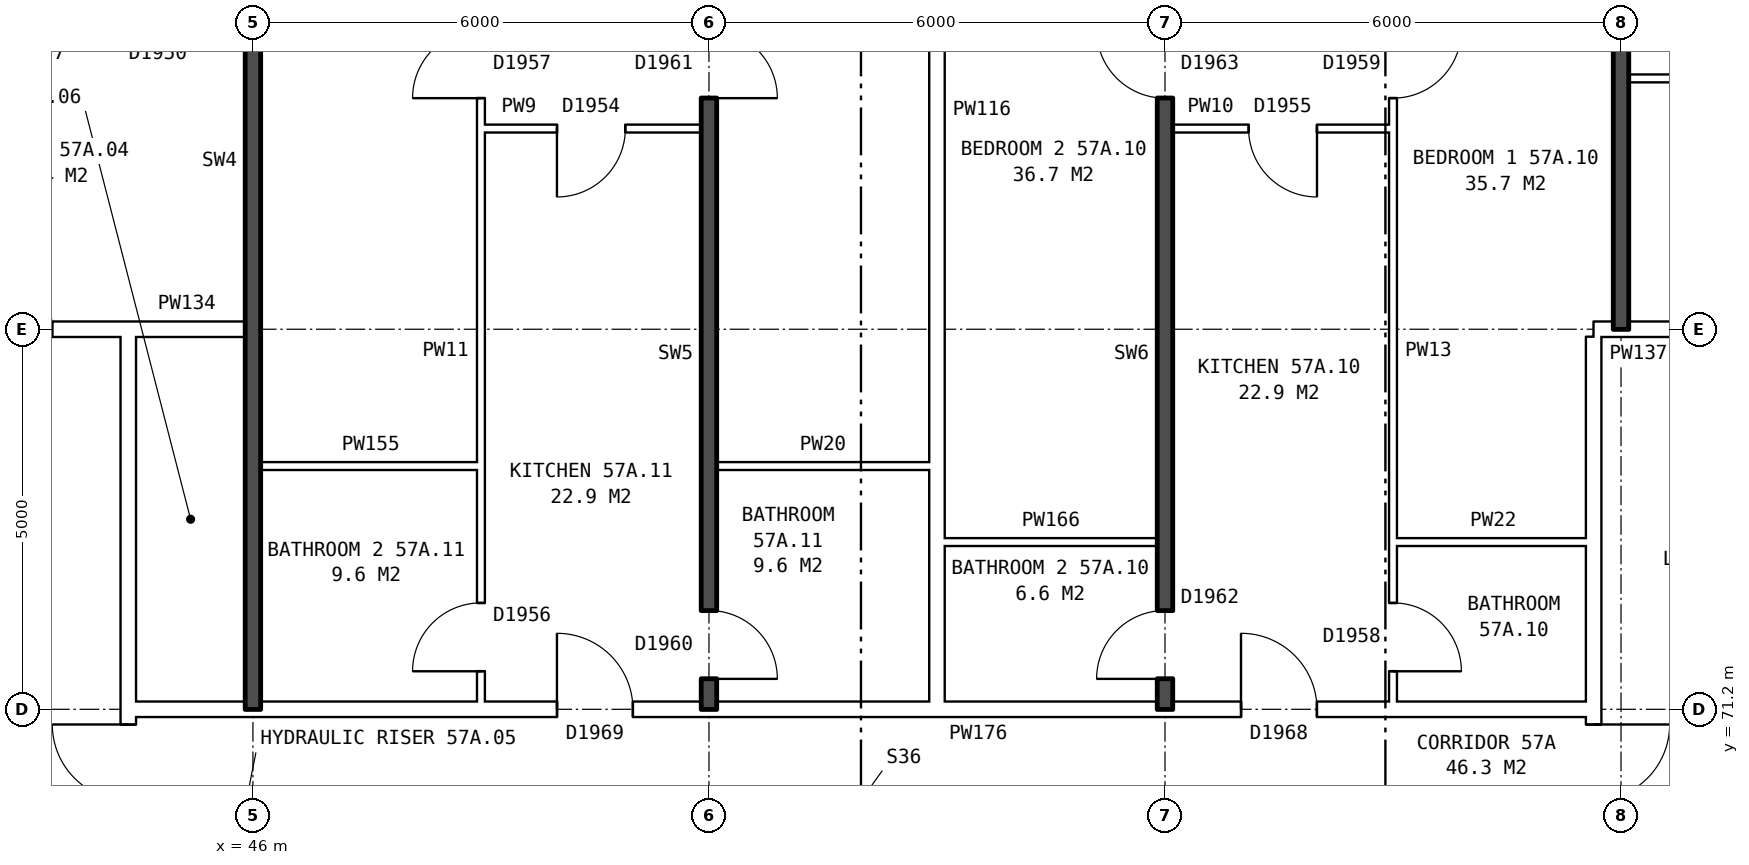
"""IFC4 building model, lengths in metres.
Left out: names, types, materials, properties, quantities, classifications, styles, units other than length and angle.
Written with IfcOpenShell. Run it as: python <this file> out.ifc"""

import sys

from ifc_helpers import new_model, si_unit, direction, frame, frame_2d, origin, place, context, subcontext, project, spatial, rectangle, extrude, element, fill, save


model = new_model("IFC4")
c1 = context("Model", 3, precision=1e-05, world=origin(), true_north=direction((0.0, 1.0)))
c2 = subcontext(c1, "Body", "Model", "MODEL_VIEW")
j1 = project(units=[si_unit("LENGTHUNIT", "METRE"), si_unit("PLANEANGLEUNIT", "RADIAN")], contexts=[c1])
p1 = place(None, origin())
s1 = spatial("IfcSite", under=j1, at=p1, CompositionType="ELEMENT")
p2 = place(p1, origin())
s2 = spatial("IfcBuilding", under=s1, at=p2, CompositionType="ELEMENT")
p3 = place(p2, frame((0.0, 0.0, 202.8)))
s3 = spatial("IfcBuildingStorey", under=s2, at=p3, CompositionType="ELEMENT", Elevation=202.8)
p4 = place(p3, frame((63.64, 63.9, 0.0), z_axis=(0.0, 0.0, 1.0), x_axis=(0.0, 1.0, 0.0)))
e1 = element("IfcWall", 1, at=p4, inside=s3, PredefinedType="PARTITIONING", context=c2, shape_type="SweptSolid", body=[
    extrude(rectangle(XDim=12.2, YDim=0.2, at=frame_2d((6.1, 0.0))), origin(), (0.0, 0.0, 1.0), 2.85),
])
p5 = place(p4, frame((5.1, 0.0, 0.0)))
e2 = element("IfcOpeningElement", 2, at=p5, cuts=e1, PredefinedType="OPENING", context=c2, shape_type="SweptSolid", body=[
    extrude(rectangle(XDim=2.0, YDim=2.1, at=frame_2d((1.0, 1.05))), frame((0.0, 0.11, 0.0), z_axis=(0.0, -1.0, 0.0), x_axis=(1.0, 0.0, 0.0)), (0.0, 0.0, 1.0), 0.22),
])
p6 = place(p3, frame((44.36, 63.9, 0.0), z_axis=(0.0, 0.0, 1.0), x_axis=(0.0, 1.0, 0.0)))
e3 = element("IfcWall", 3, at=p6, inside=s3, PredefinedType="PARTITIONING", context=c2, shape_type="SweptSolid", body=[
    extrude(rectangle(XDim=12.2, YDim=0.2, at=frame_2d((6.1, 0.0))), origin(), (0.0, 0.0, 1.0), 2.85),
])
p7 = place(p6, frame((5.1, 0.0, 0.0)))
e4 = element("IfcOpeningElement", 4, at=p7, cuts=e3, PredefinedType="OPENING", context=c2, shape_type="SweptSolid", body=[
    extrude(rectangle(XDim=2.0, YDim=2.1, at=frame_2d((1.0, 1.05))), frame((0.0, 0.11, 0.0), z_axis=(0.0, -1.0, 0.0), x_axis=(1.0, 0.0, 0.0)), (0.0, 0.0, 1.0), 0.22),
])
p8 = place(p3, frame((44.36, 71.2, 0.0), z_axis=(0.0, 0.0, 1.0), x_axis=(1.0, 0.0, 0.0)))
e5 = element("IfcWall", 5, at=p8, inside=s3, PredefinedType="PARTITIONING", context=c2, shape_type="SweptSolid", body=[
    extrude(rectangle(XDim=19.28, YDim=0.2, at=frame_2d((9.64, 0.0))), origin(), (0.0, 0.0, 1.0), 2.85),
])
p9 = place(p8, frame((14.64, 0.0, 0.0)))
e6 = element("IfcOpeningElement", 6, at=p9, cuts=e5, PredefinedType="OPENING", context=c2, shape_type="SweptSolid", body=[
    extrude(rectangle(XDim=1.0, YDim=2.1, at=frame_2d((0.5, 1.05))), frame((0.0, 0.11, 0.0), z_axis=(0.0, -1.0, 0.0), x_axis=(1.0, 0.0, 0.0)), (0.0, 0.0, 1.0), 0.22),
])
p10 = place(p8, frame((5.64, 0.0, 0.0)))
e7 = element("IfcOpeningElement", 7, at=p10, cuts=e5, PredefinedType="OPENING", context=c2, shape_type="SweptSolid", body=[
    extrude(rectangle(XDim=1.0, YDim=2.1, at=frame_2d((0.5, 1.05))), frame((0.0, 0.11, 0.0), z_axis=(0.0, -1.0, 0.0), x_axis=(1.0, 0.0, 0.0)), (0.0, 0.0, 1.0), 0.22),
])
p11 = place(p3, frame((55.1, 73.4, 0.0), z_axis=(0.0, 0.0, 1.0), x_axis=(1.0, 0.0, 0.0)))
e8 = element("IfcWall", 8, at=p11, inside=s3, PredefinedType="PARTITIONING", context=c2, shape_type="SweptSolid", body=[
    extrude(rectangle(XDim=2.8, YDim=0.1, at=frame_2d((1.4, 0.0))), origin(), (0.0, 0.0, 1.0), 2.85),
])
p12 = place(p3, frame((61.0, 73.4, 0.0), z_axis=(0.0, 0.0, 1.0), x_axis=(1.0, 0.0, 0.0)))
e9 = element("IfcWall", 9, at=p12, inside=s3, PredefinedType="PARTITIONING", context=c2, shape_type="SweptSolid", body=[
    extrude(rectangle(XDim=2.64, YDim=0.1, at=frame_2d((1.32, 0.0))), origin(), (0.0, 0.0, 1.0), 2.85),
])
p13 = place(p3, frame((46.1, 74.4, 0.0), z_axis=(0.0, 0.0, 1.0), x_axis=(1.0, 0.0, 0.0)))
e10 = element("IfcWall", 10, at=p13, inside=s3, PredefinedType="PARTITIONING", context=c2, shape_type="SweptSolid", body=[
    extrude(rectangle(XDim=2.9, YDim=0.1, at=frame_2d((1.45, 0.0))), origin(), (0.0, 0.0, 1.0), 2.85),
])
p14 = place(p3, frame((52.1, 74.4, 0.0), z_axis=(0.0, 0.0, 1.0), x_axis=(1.0, 0.0, 0.0)))
e11 = element("IfcWall", 11, at=p14, inside=s3, PredefinedType="PARTITIONING", context=c2, shape_type="SweptSolid", body=[
    extrude(rectangle(XDim=2.8, YDim=0.1, at=frame_2d((1.4, 0.0))), origin(), (0.0, 0.0, 1.0), 2.85),
])
p15 = place(p3, frame((41.36, 76.2, 0.0), z_axis=(0.0, 0.0, 1.0), x_axis=(1.0, 0.0, 0.0)))
e12 = element("IfcWall", 12, at=p15, inside=s3, PredefinedType="PARTITIONING", context=c2, shape_type="SweptSolid", body=[
    extrude(rectangle(XDim=3.0, YDim=0.2, at=frame_2d((1.5, 0.0))), origin(), (0.0, 0.0, 1.0), 2.85),
])
p16 = place(p15, frame((1.0, 0.0, 0.0)))
e13 = element("IfcOpeningElement", 13, at=p16, cuts=e12, PredefinedType="OPENING", context=c2, shape_type="SweptSolid", body=[
    extrude(rectangle(XDim=1.0, YDim=2.1, at=frame_2d((0.5, 1.05))), frame((0.0, 0.11, 0.0), z_axis=(0.0, -1.0, 0.0), x_axis=(1.0, 0.0, 0.0)), (0.0, 0.0, 1.0), 0.22),
])
p17 = place(p3, frame((44.36, 76.2, 0.0), z_axis=(0.0, 0.0, 1.0), x_axis=(1.0, 0.0, 0.0)))
e14 = element("IfcWall", 14, at=p17, inside=s3, PredefinedType="PARTITIONING", context=c2, shape_type="SweptSolid", body=[
    extrude(rectangle(XDim=1.54, YDim=0.2, at=frame_2d((0.77, 0.0))), origin(), (0.0, 0.0, 1.0), 2.85),
])
p18 = place(p3, frame((63.64, 76.2, 0.0), z_axis=(0.0, 0.0, 1.0), x_axis=(1.0, 0.0, 0.0)))
e15 = element("IfcWall", 15, at=p18, inside=s3, PredefinedType="PARTITIONING", context=c2, shape_type="SweptSolid", body=[
    extrude(rectangle(XDim=3.0, YDim=0.2, at=frame_2d((1.5, 0.0))), origin(), (0.0, 0.0, 1.0), 2.85),
])
p19 = place(p18, frame((1.18, 0.0, 0.0)))
e16 = element("IfcOpeningElement", 16, at=p19, cuts=e15, PredefinedType="OPENING", context=c2, shape_type="SweptSolid", body=[
    extrude(rectangle(XDim=1.0, YDim=2.1, at=frame_2d((0.5, 1.05))), frame((0.0, 0.11, 0.0), z_axis=(0.0, -1.0, 0.0), x_axis=(1.0, 0.0, 0.0)), (0.0, 0.0, 1.0), 0.22),
])
p20 = place(p3, frame((49.0, 78.84, 0.0), z_axis=(0.0, 0.0, 1.0), x_axis=(1.0, 0.0, 0.0)))
e17 = element("IfcWall", 17, at=p20, inside=s3, PredefinedType="PARTITIONING", context=c2, shape_type="SweptSolid", body=[
    extrude(rectangle(XDim=2.9, YDim=0.1, at=frame_2d((1.45, 0.0))), origin(), (0.0, 0.0, 1.0), 2.85),
])
p21 = place(p20, frame((1.0, 0.0, 0.0)))
e18 = element("IfcOpeningElement", 18, at=p21, cuts=e17, PredefinedType="OPENING", context=c2, shape_type="SweptSolid", body=[
    extrude(rectangle(XDim=0.9, YDim=2.1, at=frame_2d((0.45, 1.05))), frame((0.0, 0.06, 0.0), z_axis=(0.0, -1.0, 0.0), x_axis=(1.0, 0.0, 0.0)), (0.0, 0.0, 1.0), 0.12),
])
p22 = place(p3, frame((58.1, 78.84, 0.0), z_axis=(0.0, 0.0, 1.0), x_axis=(1.0, 0.0, 0.0)))
e19 = element("IfcWall", 19, at=p22, inside=s3, PredefinedType="PARTITIONING", context=c2, shape_type="SweptSolid", body=[
    extrude(rectangle(XDim=2.9, YDim=0.1, at=frame_2d((1.45, 0.0))), origin(), (0.0, 0.0, 1.0), 2.85),
])
p23 = place(p22, frame((1.0, 0.0, 0.0)))
e20 = element("IfcOpeningElement", 20, at=p23, cuts=e19, PredefinedType="OPENING", context=c2, shape_type="SweptSolid", body=[
    extrude(rectangle(XDim=0.9, YDim=2.1, at=frame_2d((0.45, 1.05))), frame((0.0, 0.06, 0.0), z_axis=(0.0, -1.0, 0.0), x_axis=(1.0, 0.0, 0.0)), (0.0, 0.0, 1.0), 0.12),
])
p24 = place(p3, frame((64.1, 79.5, 0.0), z_axis=(0.0, 0.0, 1.0), x_axis=(1.0, 0.0, 0.0)))
e21 = element("IfcWall", 21, at=p24, inside=s3, PredefinedType="PARTITIONING", context=c2, shape_type="SweptSolid", body=[
    extrude(rectangle(XDim=11.8, YDim=0.1, at=frame_2d((5.9, 0.0))), origin(), (0.0, 0.0, 1.0), 2.85),
])
p25 = place(p24, frame((3.65, 0.0, 0.0)))
e22 = element("IfcOpeningElement", 22, at=p25, cuts=e21, PredefinedType="OPENING", context=c2, shape_type="SweptSolid", body=[
    extrude(rectangle(XDim=0.9, YDim=2.1, at=frame_2d((0.45, 1.05))), frame((0.0, 0.06, 0.0), z_axis=(0.0, -1.0, 0.0), x_axis=(1.0, 0.0, 0.0)), (0.0, 0.0, 1.0), 0.12),
])
p26 = place(p24, frame((0.7, 0.0, 0.0)))
e23 = element("IfcOpeningElement", 23, at=p26, cuts=e21, PredefinedType="OPENING", context=c2, shape_type="SweptSolid", body=[
    extrude(rectangle(XDim=0.9, YDim=2.1, at=frame_2d((0.45, 1.05))), frame((0.0, 0.06, 0.0), z_axis=(0.0, -1.0, 0.0), x_axis=(1.0, 0.0, 0.0)), (0.0, 0.0, 1.0), 0.12),
])
p27 = place(p3, frame((46.0, 71.2, 0.0), z_axis=(0.0, 0.0, 1.0), x_axis=(0.0, 1.0, 0.0)))
e24 = element("IfcWall", 24, at=p27, inside=s3, PredefinedType="SOLIDWALL", context=c2, shape_type="SweptSolid", body=[
    extrude(rectangle(XDim=14.44, YDim=0.2, at=frame_2d((7.22, 0.0))), origin(), (0.0, 0.0, 1.0), 2.85),
])
p28 = place(p3, frame((49.0, 71.3, 0.0), z_axis=(0.0, 0.0, 1.0), x_axis=(0.0, 1.0, 0.0)))
e25 = element("IfcWall", 25, at=p28, inside=s3, PredefinedType="PARTITIONING", context=c2, shape_type="SweptSolid", body=[
    extrude(rectangle(XDim=14.34, YDim=0.1, at=frame_2d((7.17, 0.0))), origin(), (0.0, 0.0, 1.0), 2.85),
])
p29 = place(p28, frame((7.94, 0.0, 0.0)))
e26 = element("IfcOpeningElement", 26, at=p29, cuts=e25, PredefinedType="OPENING", context=c2, shape_type="SweptSolid", body=[
    extrude(rectangle(XDim=0.9, YDim=2.1, at=frame_2d((0.45, 1.05))), frame((0.0, 0.06, 0.0), z_axis=(0.0, -1.0, 0.0), x_axis=(1.0, 0.0, 0.0)), (0.0, 0.0, 1.0), 0.12),
])
p30 = place(p28, frame((0.4, 0.0, 0.0)))
e27 = element("IfcOpeningElement", 27, at=p30, cuts=e25, PredefinedType="OPENING", context=c2, shape_type="SweptSolid", body=[
    extrude(rectangle(XDim=0.9, YDim=2.1, at=frame_2d((0.45, 1.05))), frame((0.0, 0.06, 0.0), z_axis=(0.0, -1.0, 0.0), x_axis=(1.0, 0.0, 0.0)), (0.0, 0.0, 1.0), 0.12),
])
p31 = place(p3, frame((52.0, 71.2, 0.0), z_axis=(0.0, 0.0, 1.0), x_axis=(0.0, 1.0, 0.0)))
e28 = element("IfcWall", 28, at=p31, inside=s3, PredefinedType="SOLIDWALL", context=c2, shape_type="SweptSolid", body=[
    extrude(rectangle(XDim=14.44, YDim=0.2, at=frame_2d((7.22, 0.0))), origin(), (0.0, 0.0, 1.0), 2.85),
])
p32 = place(p31, frame((8.04, 0.0, 0.0)))
e29 = element("IfcOpeningElement", 29, at=p32, cuts=e28, PredefinedType="OPENING", context=c2, shape_type="SweptSolid", body=[
    extrude(rectangle(XDim=0.9, YDim=2.1, at=frame_2d((0.45, 1.05))), frame((0.0, 0.11, 0.0), z_axis=(0.0, -1.0, 0.0), x_axis=(1.0, 0.0, 0.0)), (0.0, 0.0, 1.0), 0.22),
])
p33 = place(p31, frame((0.4, 0.0, 0.0)))
e30 = element("IfcOpeningElement", 30, at=p33, cuts=e28, PredefinedType="OPENING", context=c2, shape_type="SweptSolid", body=[
    extrude(rectangle(XDim=0.9, YDim=2.1, at=frame_2d((0.45, 1.05))), frame((0.0, 0.11, 0.0), z_axis=(0.0, -1.0, 0.0), x_axis=(1.0, 0.0, 0.0)), (0.0, 0.0, 1.0), 0.22),
])
p34 = place(p3, frame((55.0, 71.3, 0.0), z_axis=(0.0, 0.0, 1.0), x_axis=(0.0, 1.0, 0.0)))
e31 = element("IfcWall", 31, at=p34, inside=s3, PredefinedType="PARTITIONING", context=c2, shape_type="SweptSolid", body=[
    extrude(rectangle(XDim=14.34, YDim=0.2, at=frame_2d((7.17, 0.0))), origin(), (0.0, 0.0, 1.0), 2.85),
])
p35 = place(p3, frame((58.0, 71.2, 0.0), z_axis=(0.0, 0.0, 1.0), x_axis=(0.0, 1.0, 0.0)))
e32 = element("IfcWall", 32, at=p35, inside=s3, PredefinedType="SOLIDWALL", context=c2, shape_type="SweptSolid", body=[
    extrude(rectangle(XDim=14.44, YDim=0.2, at=frame_2d((7.22, 0.0))), origin(), (0.0, 0.0, 1.0), 2.85),
])
p36 = place(p35, frame((8.04, 0.0, 0.0)))
e33 = element("IfcOpeningElement", 33, at=p36, cuts=e32, PredefinedType="OPENING", context=c2, shape_type="SweptSolid", body=[
    extrude(rectangle(XDim=0.9, YDim=2.1, at=frame_2d((0.45, 1.05))), frame((0.0, 0.11, 0.0), z_axis=(0.0, -1.0, 0.0), x_axis=(1.0, 0.0, 0.0)), (0.0, 0.0, 1.0), 0.22),
])
p37 = place(p35, frame((0.4, 0.0, 0.0)))
e34 = element("IfcOpeningElement", 34, at=p37, cuts=e32, PredefinedType="OPENING", context=c2, shape_type="SweptSolid", body=[
    extrude(rectangle(XDim=0.9, YDim=2.1, at=frame_2d((0.45, 1.05))), frame((0.0, 0.11, 0.0), z_axis=(0.0, -1.0, 0.0), x_axis=(1.0, 0.0, 0.0)), (0.0, 0.0, 1.0), 0.22),
])
p38 = place(p3, frame((61.0, 71.3, 0.0), z_axis=(0.0, 0.0, 1.0), x_axis=(0.0, 1.0, 0.0)))
e35 = element("IfcWall", 35, at=p38, inside=s3, PredefinedType="PARTITIONING", context=c2, shape_type="SweptSolid", body=[
    extrude(rectangle(XDim=14.34, YDim=0.1, at=frame_2d((7.17, 0.0))), origin(), (0.0, 0.0, 1.0), 2.85),
])
p39 = place(p38, frame((7.94, 0.0, 0.0)))
e36 = element("IfcOpeningElement", 36, at=p39, cuts=e35, PredefinedType="OPENING", context=c2, shape_type="SweptSolid", body=[
    extrude(rectangle(XDim=0.9, YDim=2.1, at=frame_2d((0.45, 1.05))), frame((0.0, 0.06, 0.0), z_axis=(0.0, -1.0, 0.0), x_axis=(1.0, 0.0, 0.0)), (0.0, 0.0, 1.0), 0.12),
])
p40 = place(p38, frame((0.4, 0.0, 0.0)))
e37 = element("IfcOpeningElement", 37, at=p40, cuts=e35, PredefinedType="OPENING", context=c2, shape_type="SweptSolid", body=[
    extrude(rectangle(XDim=0.9, YDim=2.1, at=frame_2d((0.45, 1.05))), frame((0.0, 0.06, 0.0), z_axis=(0.0, -1.0, 0.0), x_axis=(1.0, 0.0, 0.0)), (0.0, 0.0, 1.0), 0.12),
])
p41 = place(p3, frame((64.0, 76.2, 0.0), z_axis=(0.0, 0.0, 1.0), x_axis=(0.0, 1.0, 0.0)))
e38 = element("IfcWall", 38, at=p41, inside=s3, PredefinedType="SOLIDWALL", context=c2, shape_type="SweptSolid", body=[
    extrude(rectangle(XDim=9.44, YDim=0.2, at=frame_2d((4.72, 0.0))), origin(), (0.0, 0.0, 1.0), 2.85),
])
p42 = place(p5, frame((2.0, 0.0, 0.0), z_axis=(0.0, 0.0, 1.0), x_axis=(-1.0, 0.0, 0.0)))
e39 = element("IfcDoor", 39, at=p42, inside=s3, OperationType="DOUBLE_DOOR_SINGLE_SWING", PredefinedType="DOOR", context=c2, shape_type="SweptSolid", body=[
    extrude(rectangle(XDim=2.0, YDim=2.1, at=frame_2d((1.0, 1.05))), frame((0.0, 0.025, 0.0), z_axis=(0.0, -1.0, 0.0), x_axis=(1.0, 0.0, 0.0)), (0.0, 0.0, 1.0), 0.05),
])
fill(e2, e39)
p43 = place(p7, origin())
e40 = element("IfcDoor", 40, at=p43, inside=s3, OperationType="DOUBLE_DOOR_SINGLE_SWING", PredefinedType="DOOR", context=c2, shape_type="SweptSolid", body=[
    extrude(rectangle(XDim=2.0, YDim=2.1, at=frame_2d((1.0, 1.05))), frame((0.0, 0.025, 0.0), z_axis=(0.0, -1.0, 0.0), x_axis=(1.0, 0.0, 0.0)), (0.0, 0.0, 1.0), 0.05),
])
fill(e4, e40)
p44 = place(p39, frame((0.9, 0.0, 0.0), z_axis=(0.0, 0.0, 1.0), x_axis=(-1.0, 0.0, 0.0)))
e41 = element("IfcDoor", 41, at=p44, inside=s3, OperationType="SINGLE_SWING_LEFT", PredefinedType="DOOR", context=c2, shape_type="SweptSolid", body=[
    extrude(rectangle(XDim=0.9, YDim=2.1, at=frame_2d((0.45, 1.05))), frame((0.0, 0.025, 0.0), z_axis=(0.0, -1.0, 0.0), x_axis=(1.0, 0.0, 0.0)), (0.0, 0.0, 1.0), 0.05),
])
fill(e36, e41)
p45 = place(p36, origin())
e42 = element("IfcDoor", 42, at=p45, inside=s3, OperationType="SINGLE_SWING_RIGHT", PredefinedType="DOOR", context=c2, shape_type="SweptSolid", body=[
    extrude(rectangle(XDim=0.9, YDim=2.1, at=frame_2d((0.45, 1.05))), frame((0.0, 0.025, 0.0), z_axis=(0.0, -1.0, 0.0), x_axis=(1.0, 0.0, 0.0)), (0.0, 0.0, 1.0), 0.05),
])
fill(e33, e42)
p46 = place(p9, origin())
e43 = element("IfcDoor", 43, at=p46, inside=s3, OperationType="SINGLE_SWING_LEFT", PredefinedType="DOOR", context=c2, shape_type="SweptSolid", body=[
    extrude(rectangle(XDim=1.0, YDim=2.1, at=frame_2d((0.5, 1.05))), frame((0.0, 0.025, 0.0), z_axis=(0.0, -1.0, 0.0), x_axis=(1.0, 0.0, 0.0)), (0.0, 0.0, 1.0), 0.05),
])
fill(e6, e43)
p47 = place(p23, frame((0.9, 0.0, 0.0), z_axis=(0.0, 0.0, 1.0), x_axis=(-1.0, 0.0, 0.0)))
e44 = element("IfcDoor", 44, at=p47, inside=s3, OperationType="SINGLE_SWING_LEFT", PredefinedType="DOOR", context=c2, shape_type="SweptSolid", body=[
    extrude(rectangle(XDim=0.9, YDim=2.1, at=frame_2d((0.45, 1.05))), frame((0.0, 0.025, 0.0), z_axis=(0.0, -1.0, 0.0), x_axis=(1.0, 0.0, 0.0)), (0.0, 0.0, 1.0), 0.05),
])
fill(e20, e44)
p48 = place(p40, frame((0.9, 0.0, 0.0), z_axis=(0.0, 0.0, 1.0), x_axis=(-1.0, 0.0, 0.0)))
e45 = element("IfcDoor", 45, at=p48, inside=s3, OperationType="SINGLE_SWING_RIGHT", PredefinedType="DOOR", context=c2, shape_type="SweptSolid", body=[
    extrude(rectangle(XDim=0.9, YDim=2.1, at=frame_2d((0.45, 1.05))), frame((0.0, 0.025, 0.0), z_axis=(0.0, -1.0, 0.0), x_axis=(1.0, 0.0, 0.0)), (0.0, 0.0, 1.0), 0.05),
])
fill(e37, e45)
p49 = place(p37, origin())
e46 = element("IfcDoor", 46, at=p49, inside=s3, OperationType="SINGLE_SWING_LEFT", PredefinedType="DOOR", context=c2, shape_type="SweptSolid", body=[
    extrude(rectangle(XDim=0.9, YDim=2.1, at=frame_2d((0.45, 1.05))), frame((0.0, 0.025, 0.0), z_axis=(0.0, -1.0, 0.0), x_axis=(1.0, 0.0, 0.0)), (0.0, 0.0, 1.0), 0.05),
])
fill(e34, e46)
p50 = place(p32, frame((0.9, 0.0, 0.0), z_axis=(0.0, 0.0, 1.0), x_axis=(-1.0, 0.0, 0.0)))
e47 = element("IfcDoor", 47, at=p50, inside=s3, OperationType="SINGLE_SWING_RIGHT", PredefinedType="DOOR", context=c2, shape_type="SweptSolid", body=[
    extrude(rectangle(XDim=0.9, YDim=2.1, at=frame_2d((0.45, 1.05))), frame((0.0, 0.025, 0.0), z_axis=(0.0, -1.0, 0.0), x_axis=(1.0, 0.0, 0.0)), (0.0, 0.0, 1.0), 0.05),
])
fill(e29, e47)
p51 = place(p29, origin())
e48 = element("IfcDoor", 48, at=p51, inside=s3, OperationType="SINGLE_SWING_LEFT", PredefinedType="DOOR", context=c2, shape_type="SweptSolid", body=[
    extrude(rectangle(XDim=0.9, YDim=2.1, at=frame_2d((0.45, 1.05))), frame((0.0, 0.025, 0.0), z_axis=(0.0, -1.0, 0.0), x_axis=(1.0, 0.0, 0.0)), (0.0, 0.0, 1.0), 0.05),
])
fill(e26, e48)
p52 = place(p10, origin())
e49 = element("IfcDoor", 49, at=p52, inside=s3, OperationType="SINGLE_SWING_LEFT", PredefinedType="DOOR", context=c2, shape_type="SweptSolid", body=[
    extrude(rectangle(XDim=1.0, YDim=2.1, at=frame_2d((0.5, 1.05))), frame((0.0, 0.025, 0.0), z_axis=(0.0, -1.0, 0.0), x_axis=(1.0, 0.0, 0.0)), (0.0, 0.0, 1.0), 0.05),
])
fill(e7, e49)
p53 = place(p21, frame((0.9, 0.0, 0.0), z_axis=(0.0, 0.0, 1.0), x_axis=(-1.0, 0.0, 0.0)))
e50 = element("IfcDoor", 50, at=p53, inside=s3, OperationType="SINGLE_SWING_RIGHT", PredefinedType="DOOR", context=c2, shape_type="SweptSolid", body=[
    extrude(rectangle(XDim=0.9, YDim=2.1, at=frame_2d((0.45, 1.05))), frame((0.0, 0.025, 0.0), z_axis=(0.0, -1.0, 0.0), x_axis=(1.0, 0.0, 0.0)), (0.0, 0.0, 1.0), 0.05),
])
fill(e18, e50)
p54 = place(p33, frame((0.9, 0.0, 0.0), z_axis=(0.0, 0.0, 1.0), x_axis=(-1.0, 0.0, 0.0)))
e51 = element("IfcDoor", 51, at=p54, inside=s3, OperationType="SINGLE_SWING_RIGHT", PredefinedType="DOOR", context=c2, shape_type="SweptSolid", body=[
    extrude(rectangle(XDim=0.9, YDim=2.1, at=frame_2d((0.45, 1.05))), frame((0.0, 0.025, 0.0), z_axis=(0.0, -1.0, 0.0), x_axis=(1.0, 0.0, 0.0)), (0.0, 0.0, 1.0), 0.05),
])
fill(e30, e51)
p55 = place(p30, origin())
e52 = element("IfcDoor", 52, at=p55, inside=s3, OperationType="SINGLE_SWING_LEFT", PredefinedType="DOOR", context=c2, shape_type="SweptSolid", body=[
    extrude(rectangle(XDim=0.9, YDim=2.1, at=frame_2d((0.45, 1.05))), frame((0.0, 0.025, 0.0), z_axis=(0.0, -1.0, 0.0), x_axis=(1.0, 0.0, 0.0)), (0.0, 0.0, 1.0), 0.05),
])
fill(e27, e52)
save(model, sys.argv[1])
